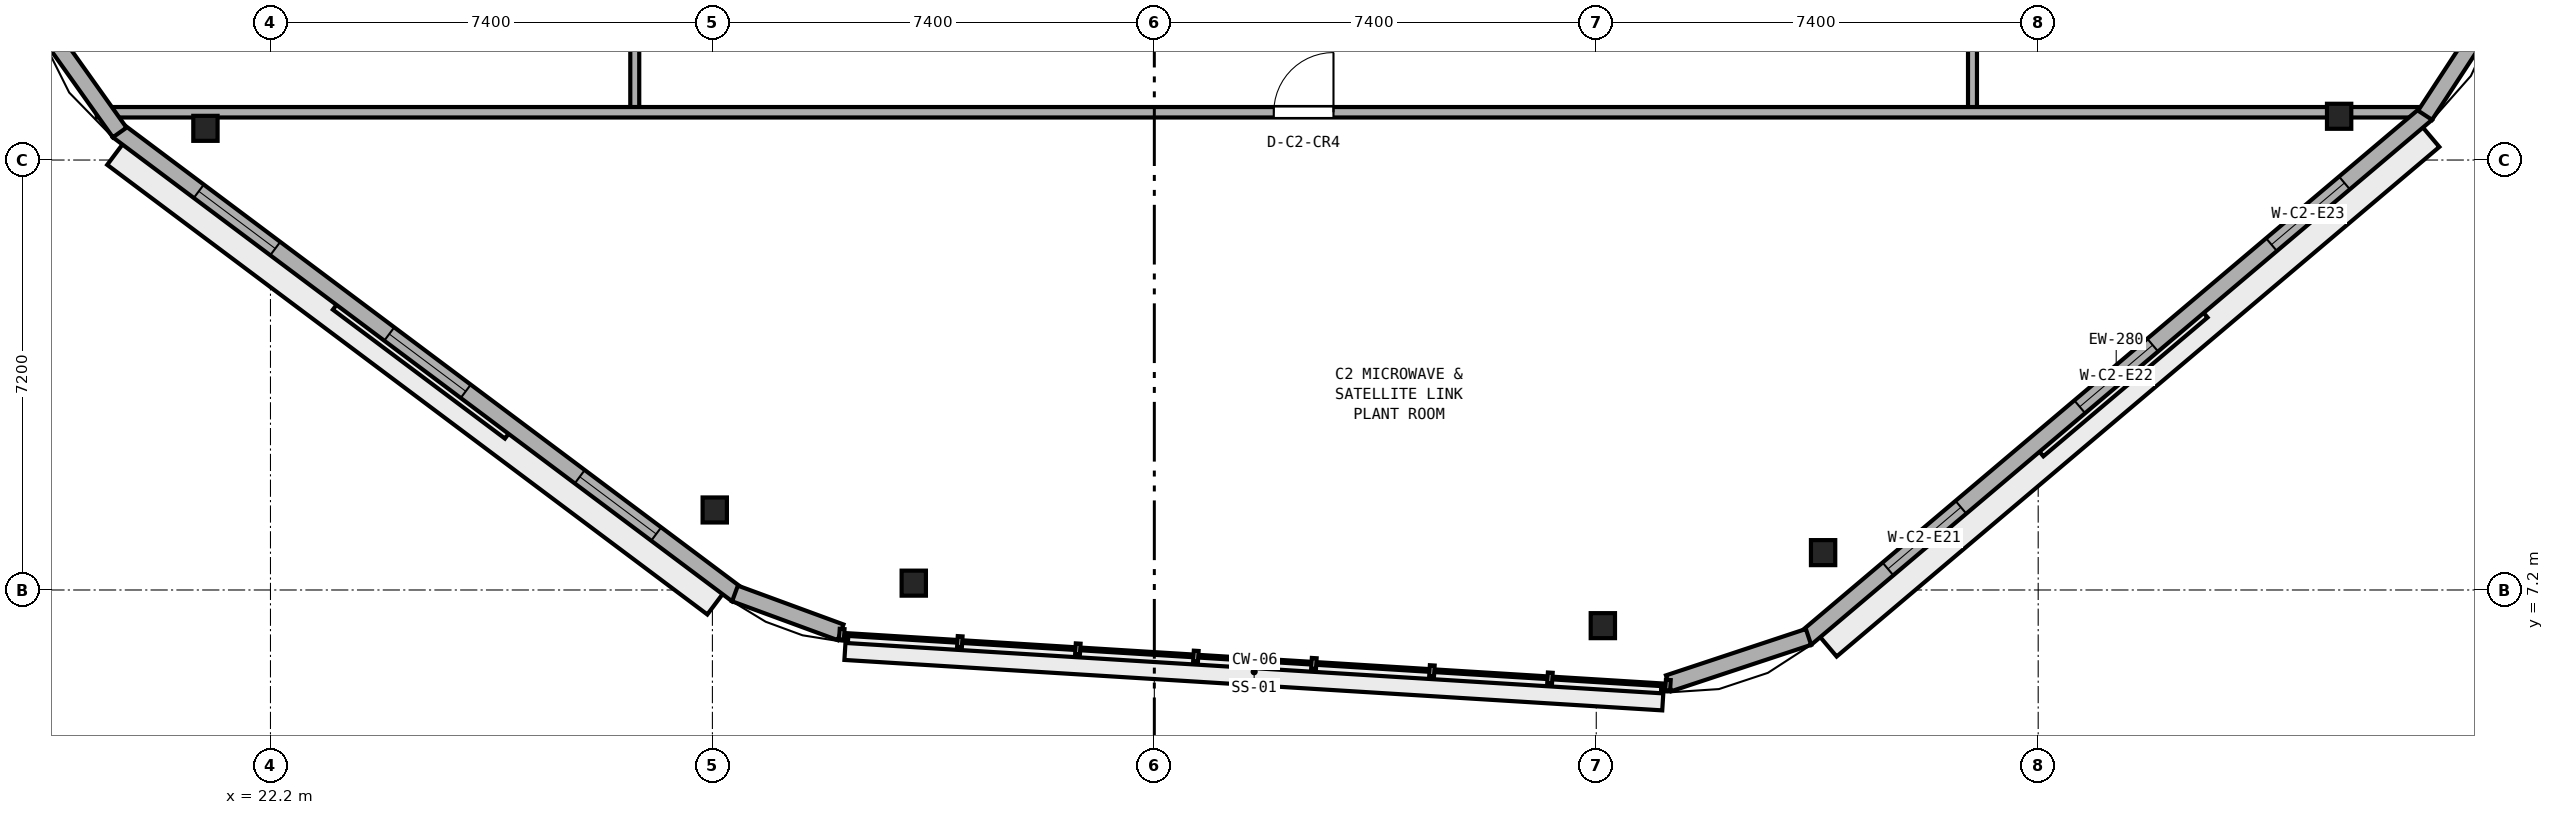
"""IFC4 building model, lengths in metres.
Left out: names, types, materials, properties, quantities, classifications, styles, units other than length and angle.
Written with IfcOpenShell. Run it as: python <this file> out.ifc"""

import sys

from ifc_helpers import new_model, si_unit, direction, frame, frame_2d, origin, origin_2d, place, context, subcontext, project, spatial, rectangle, i_section, extrude, element, fill, save


model = new_model("IFC4")
c1 = context("Model", 3, precision=1e-05, world=origin(), true_north=direction((0.0, 1.0)))
c2 = subcontext(c1, "Body", "Model", "MODEL_VIEW")
j1 = project(units=[si_unit("LENGTHUNIT", "METRE"), si_unit("PLANEANGLEUNIT", "RADIAN")], contexts=[c1])
p1 = place(None, origin())
s1 = spatial("IfcSite", under=j1, at=p1, CompositionType="ELEMENT")
p2 = place(p1, origin())
s2 = spatial("IfcBuilding", under=s1, at=p2, CompositionType="ELEMENT")
p3 = place(p2, frame((0.0, 0.0, 317.4)))
s3 = spatial("IfcBuildingStorey", under=s2, at=p3, CompositionType="ELEMENT", Elevation=317.4)
for number, where, z_axis, x_axis in (
    (1, (32.972, 7.315, 0.0), (0.0, 0.0, 1.0), (1.0, 0.0, 0.0)),
    (2, (44.51, 6.603, 0.0), (0.0, 0.0, 1.0), (1.0, 0.0, 0.0)),
    (3, (48.198, 7.826, 0.0), (0.0, 0.0, 1.0), (1.0, 0.0, 0.0)),
    (4, (56.839, 15.133, 0.0), (0.0, 0.0, 1.0), (1.0, 0.0, 0.0)),
    (5, (21.111, 14.931, 0.0), (0.0, 0.0, 1.0), (1.0, 0.0, 0.0)),
    (6, (29.639, 8.54, 0.0), (0.0, 0.0, 1.0), (1.0, 0.0, 0.0)),
):
    element("IfcColumn", number, at=place(p3, frame(where, z_axis=z_axis, x_axis=x_axis)), inside=s3, PredefinedType="COLUMN", context=c2, shape_type="SweptSolid", body=[
        extrude(i_section(OverallWidth=0.407, OverallDepth=0.419, WebThickness=0.031, FlangeThickness=0.049, at=origin_2d()), origin(), (0.0, 0.0, 1.0), 4.0),
    ])
p4 = place(p3, frame((50.7, 15.2, 0.0), z_axis=(0.0, 0.0, 1.0), x_axis=(0.0, 1.0, 0.0)))
e7 = element("IfcWall", 7, at=p4, inside=s3, PredefinedType="PARTITIONING", context=c2, shape_type="SweptSolid", body=[
    extrude(rectangle(XDim=6.79, YDim=0.15, at=frame_2d((3.395, 0.0))), origin(), (0.0, 0.0, 1.0), 3.72),
])
p5 = place(p4, frame((2.895, 0.0, 0.0)))
e8 = element("IfcOpeningElement", 8, at=p5, cuts=e7, PredefinedType="OPENING", context=c2, shape_type="SweptSolid", body=[
    extrude(rectangle(XDim=1.0, YDim=2.12, at=frame_2d((0.5, 1.06))), frame((0.0, 0.085, 0.0), z_axis=(0.0, -1.0, 0.0), x_axis=(1.0, 0.0, 0.0)), (0.0, 0.0, 1.0), 0.17),
])
p6 = place(p3, frame((28.3, 15.2, 0.0), z_axis=(0.0, 0.0, 1.0), x_axis=(0.0, 1.0, 0.0)))
e9 = element("IfcWall", 9, at=p6, inside=s3, PredefinedType="PARTITIONING", context=c2, shape_type="SweptSolid", body=[
    extrude(rectangle(XDim=20.0, YDim=0.15, at=frame_2d((10.0, 0.0))), origin(), (0.0, 0.0, 1.0), 3.72),
])
p7 = place(p6, frame((9.5, 0.0, 0.0)))
e10 = element("IfcOpeningElement", 10, at=p7, cuts=e9, PredefinedType="OPENING", context=c2, shape_type="SweptSolid", body=[
    extrude(rectangle(XDim=1.0, YDim=2.12, at=frame_2d((0.5, 1.06))), frame((0.0, 0.085, 0.0), z_axis=(0.0, -1.0, 0.0), x_axis=(1.0, 0.0, 0.0)), (0.0, 0.0, 1.0), 0.17),
])
p8 = place(p3, frame((19.292, 15.2, 0.0), z_axis=(0.0, 0.0, 1.0), x_axis=(1.0, 0.0, 0.0)))
e11 = element("IfcWall", 11, at=p8, inside=s3, PredefinedType="PARTITIONING", context=c2, shape_type="SweptSolid", body=[
    extrude(rectangle(XDim=39.076, YDim=0.175, at=frame_2d((19.538, 0.0))), origin(), (0.0, 0.0, 1.0), 2.37),
])
p9 = place(p8, frame((19.708, 0.0, 0.0)))
e12 = element("IfcOpeningElement", 12, at=p9, cuts=e11, PredefinedType="OPENING", context=c2, shape_type="SweptSolid", body=[
    extrude(rectangle(XDim=1.0, YDim=2.12, at=frame_2d((0.5, 1.06))), frame((0.0, 0.097, 0.0), z_axis=(0.0, -1.0, 0.0), x_axis=(1.0, 0.0, 0.0)), (0.0, 0.0, 1.0), 0.195),
])
p10 = place(p3, frame((47.908, 6.388, 0.0), z_axis=(0.0, 0.0, 1.0), x_axis=(0.763574643448, 0.645719570621, 0.0)))
e13 = element("IfcWall", 13, at=p10, inside=s3, PredefinedType="STANDARD", context=c2, shape_type="SweptSolid", body=[
    extrude(rectangle(XDim=13.616, YDim=0.28, at=frame_2d((6.808, 0.0))), origin(), (0.0, 0.0, 1.0), 3.72),
])
p11 = place(p10, frame((1.803, 0.0, 0.9)))
e14 = element("IfcOpeningElement", 14, at=p11, cuts=e13, PredefinedType="OPENING", context=c2, shape_type="SweptSolid", body=[
    extrude(rectangle(XDim=1.6, YDim=1.45, at=frame_2d((0.8, 0.725))), frame((0.0, 0.15, 0.0), z_axis=(0.0, -1.0, 0.0), x_axis=(1.0, 0.0, 0.0)), (0.0, 0.0, 1.0), 0.3),
])
p12 = place(p10, frame((6.008, 0.0, 0.9)))
e15 = element("IfcOpeningElement", 15, at=p12, cuts=e13, PredefinedType="OPENING", context=c2, shape_type="SweptSolid", body=[
    extrude(rectangle(XDim=1.6, YDim=1.45, at=frame_2d((0.8, 0.725))), frame((0.0, 0.15, 0.0), z_axis=(0.0, -1.0, 0.0), x_axis=(1.0, 0.0, 0.0)), (0.0, 0.0, 1.0), 0.3),
])
p13 = place(p10, frame((10.213, 0.0, 0.9)))
e16 = element("IfcOpeningElement", 16, at=p13, cuts=e13, PredefinedType="OPENING", context=c2, shape_type="SweptSolid", body=[
    extrude(rectangle(XDim=1.6, YDim=1.45, at=frame_2d((0.8, 0.725))), frame((0.0, 0.15, 0.0), z_axis=(0.0, -1.0, 0.0), x_axis=(1.0, 0.0, 0.0)), (0.0, 0.0, 1.0), 0.3),
])
p14 = place(p3, frame((19.645, 14.892, 0.0), z_axis=(0.0, 0.0, 1.0), x_axis=(0.800246388275, -0.599671341697, 0.0)))
e17 = element("IfcWall", 17, at=p14, inside=s3, PredefinedType="STANDARD", context=c2, shape_type="SweptSolid", body=[
    extrude(rectangle(XDim=12.957, YDim=0.28, at=frame_2d((6.479, 0.0))), origin(), (0.0, 0.0, 1.0), 3.72),
])
p15 = place(p14, frame((1.693, 0.0, 0.9)))
e18 = element("IfcOpeningElement", 18, at=p15, cuts=e17, PredefinedType="OPENING", context=c2, shape_type="SweptSolid", body=[
    extrude(rectangle(XDim=1.6, YDim=1.45, at=frame_2d((0.8, 0.725))), frame((0.0, 0.15, 0.0), z_axis=(0.0, -1.0, 0.0), x_axis=(1.0, 0.0, 0.0)), (0.0, 0.0, 1.0), 0.3),
])
p16 = place(p14, frame((5.678, 0.0, 0.9)))
e19 = element("IfcOpeningElement", 19, at=p16, cuts=e17, PredefinedType="OPENING", context=c2, shape_type="SweptSolid", body=[
    extrude(rectangle(XDim=1.6, YDim=1.45, at=frame_2d((0.8, 0.725))), frame((0.0, 0.15, 0.0), z_axis=(0.0, -1.0, 0.0), x_axis=(1.0, 0.0, 0.0)), (0.0, 0.0, 1.0), 0.3),
])
p17 = place(p14, frame((9.664, 0.0, 0.9)))
e20 = element("IfcOpeningElement", 20, at=p17, cuts=e17, PredefinedType="OPENING", context=c2, shape_type="SweptSolid", body=[
    extrude(rectangle(XDim=1.6, YDim=1.45, at=frame_2d((0.8, 0.725))), frame((0.0, 0.15, 0.0), z_axis=(0.0, -1.0, 0.0), x_axis=(1.0, 0.0, 0.0)), (0.0, 0.0, 1.0), 0.3),
])
p18 = place(p3, frame((45.611, 5.637, 0.0), z_axis=(0.0, 0.0, 1.0), x_axis=(0.949156955877, 0.314803229192, 0.0)))
e21 = element("IfcWall", 21, at=p18, inside=s3, PredefinedType="STANDARD", context=c2, shape_type="SweptSolid", body=[
    extrude(rectangle(XDim=2.469, YDim=0.28, at=frame_2d((1.234, 0.0))), origin(), (0.0, 0.0, 1.0), 3.72),
])
p19 = place(p3, frame((58.278, 15.15, 0.0), z_axis=(0.0, 0.0, 1.0), x_axis=(0.547367908429, 0.836892091504, 0.0)))
e22 = element("IfcWall", 22, at=p19, inside=s3, PredefinedType="STANDARD", context=c2, shape_type="SweptSolid", body=[
    extrude(rectangle(XDim=1.942, YDim=0.28, at=frame_2d((0.971, 0.0))), origin(), (0.0, 0.0, 1.0), 3.72),
])
p20 = place(p3, frame((18.475, 16.547, 0.0), z_axis=(0.0, 0.0, 1.0), x_axis=(0.579786647816, -0.814768337022, 0.0)))
e23 = element("IfcWall", 23, at=p20, inside=s3, PredefinedType="STANDARD", context=c2, shape_type="SweptSolid", body=[
    extrude(rectangle(XDim=2.07, YDim=0.28, at=frame_2d((1.035, 0.0))), origin(), (0.0, 0.0, 1.0), 3.72),
])
p21 = place(p3, frame((29.978, 7.142, 0.0), z_axis=(0.0, 0.0, 1.0), x_axis=(0.938531023634, -0.345194898103, 0.0)))
e24 = element("IfcWall", 24, at=p21, inside=s3, PredefinedType="STANDARD", context=c2, shape_type="SweptSolid", body=[
    extrude(rectangle(XDim=1.884, YDim=0.28, at=frame_2d((0.942, 0.0))), origin(), (0.0, 0.0, 1.0), 3.72),
])
p22 = place(p9, origin())
e25 = element("IfcDoor", 25, at=p22, inside=s3, OperationType="SINGLE_SWING_RIGHT", PredefinedType="DOOR", context=c2, shape_type="SweptSolid", body=[
    extrude(rectangle(XDim=1.0, YDim=2.12, at=frame_2d((0.5, 1.06))), frame((0.0, 0.025, 0.0), z_axis=(0.0, -1.0, 0.0), x_axis=(1.0, 0.0, 0.0)), (0.0, 0.0, 1.0), 0.05),
])
fill(e12, e25)
p23 = place(p11, origin())
e26 = element("IfcWindow", 26, at=p23, inside=s3, PartitioningType="SINGLE_PANEL", PredefinedType="WINDOW", context=c2, shape_type="SweptSolid", body=[
    extrude(rectangle(XDim=1.6, YDim=1.45, at=frame_2d((0.8, 0.725))), frame((0.0, 0.03, 0.0), z_axis=(0.0, -1.0, 0.0), x_axis=(1.0, 0.0, 0.0)), (0.0, 0.0, 1.0), 0.06),
])
fill(e14, e26)
p24 = place(p12, origin())
e27 = element("IfcWindow", 27, at=p24, inside=s3, PartitioningType="SINGLE_PANEL", PredefinedType="WINDOW", context=c2, shape_type="SweptSolid", body=[
    extrude(rectangle(XDim=1.6, YDim=1.45, at=frame_2d((0.8, 0.725))), frame((0.0, 0.03, 0.0), z_axis=(0.0, -1.0, 0.0), x_axis=(1.0, 0.0, 0.0)), (0.0, 0.0, 1.0), 0.06),
])
fill(e15, e27)
p25 = place(p13, origin())
e28 = element("IfcWindow", 28, at=p25, inside=s3, PartitioningType="SINGLE_PANEL", PredefinedType="WINDOW", context=c2, shape_type="SweptSolid", body=[
    extrude(rectangle(XDim=1.6, YDim=1.45, at=frame_2d((0.8, 0.725))), frame((0.0, 0.03, 0.0), z_axis=(0.0, -1.0, 0.0), x_axis=(1.0, 0.0, 0.0)), (0.0, 0.0, 1.0), 0.06),
])
fill(e16, e28)
p26 = place(p15, origin())
e29 = element("IfcWindow", 29, at=p26, inside=s3, PartitioningType="SINGLE_PANEL", PredefinedType="WINDOW", context=c2, shape_type="SweptSolid", body=[
    extrude(rectangle(XDim=1.6, YDim=1.45, at=frame_2d((0.8, 0.725))), frame((0.0, 0.03, 0.0), z_axis=(0.0, -1.0, 0.0), x_axis=(1.0, 0.0, 0.0)), (0.0, 0.0, 1.0), 0.06),
])
fill(e18, e29)
p27 = place(p16, origin())
e30 = element("IfcWindow", 30, at=p27, inside=s3, PartitioningType="SINGLE_PANEL", PredefinedType="WINDOW", context=c2, shape_type="SweptSolid", body=[
    extrude(rectangle(XDim=1.6, YDim=1.45, at=frame_2d((0.8, 0.725))), frame((0.0, 0.03, 0.0), z_axis=(0.0, -1.0, 0.0), x_axis=(1.0, 0.0, 0.0)), (0.0, 0.0, 1.0), 0.06),
])
fill(e19, e30)
p28 = place(p17, origin())
e31 = element("IfcWindow", 31, at=p28, inside=s3, PartitioningType="SINGLE_PANEL", PredefinedType="WINDOW", context=c2, shape_type="SweptSolid", body=[
    extrude(rectangle(XDim=1.6, YDim=1.45, at=frame_2d((0.8, 0.725))), frame((0.0, 0.03, 0.0), z_axis=(0.0, -1.0, 0.0), x_axis=(1.0, 0.0, 0.0)), (0.0, 0.0, 1.0), 0.06),
])
fill(e20, e31)
save(model, sys.argv[1])
